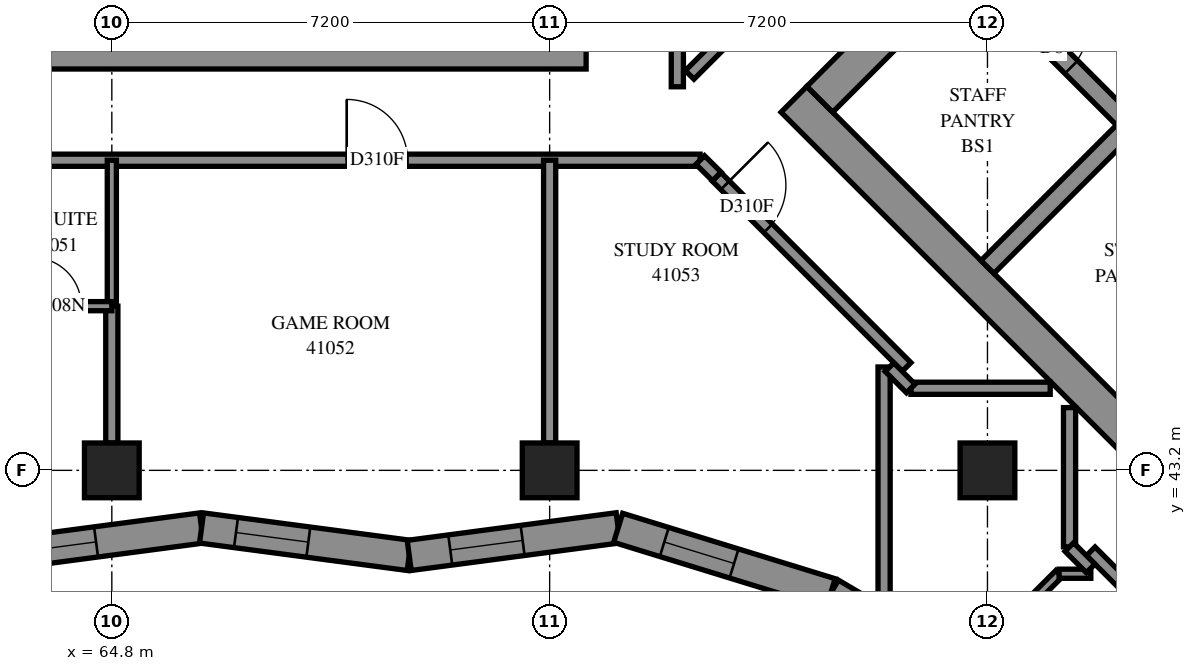
"""IFC4 building model, lengths in metres.
Left out: names, types, materials, properties, quantities, classifications, styles, units other than length and angle.
Written with IfcOpenShell. Run it as: python <this file> out.ifc"""

import sys

from ifc_helpers import new_model, si_unit, direction, frame, frame_2d, origin, origin_2d, place, context, subcontext, project, spatial, polyline, rectangle, outline, extrude, element, fill, save


model = new_model("IFC4")
c1 = context("Model", 3, precision=1e-05, world=origin(), true_north=direction((0.0, 1.0)))
c2 = subcontext(c1, "Body", "Model", "MODEL_VIEW")
j1 = project(units=[si_unit("LENGTHUNIT", "METRE"), si_unit("PLANEANGLEUNIT", "RADIAN")], contexts=[c1])
p1 = place(None, origin())
s1 = spatial("IfcSite", under=j1, at=p1, CompositionType="ELEMENT")
p2 = place(p1, origin())
s2 = spatial("IfcBuilding", under=s1, at=p2, CompositionType="ELEMENT")
p3 = place(p2, frame((0.0, 0.0, 152.4)))
s3 = spatial("IfcBuildingStorey", under=s2, at=p3, CompositionType="ELEMENT", Elevation=152.4)
for number, where, z_axis, x_axis in (
    (1, (64.8, 43.2, 0.0), (0.0, 0.0, 1.0), (1.0, 0.0, 0.0)),
    (2, (72.0, 43.2, 0.0), (0.0, 0.0, 1.0), (1.0, 0.0, 0.0)),
    (3, (79.2, 43.2, 0.0), (0.0, 0.0, 1.0), (1.0, 0.0, 0.0)),
):
    element("IfcColumn", number, at=place(p3, frame(where, z_axis=z_axis, x_axis=x_axis)), inside=s3, PredefinedType="COLUMN", context=c2, shape_type="SweptSolid", body=[
        extrude(rectangle(XDim=0.9, YDim=0.9, at=origin_2d()), origin(), (0.0, 0.0, 1.0), 3.1),
    ])
for number, where, z_axis, x_axis in (
    (4, (57.0, 50.1, -0.3), (0.0, 0.0, 1.0), (1.0, 0.0, 0.0)),
    (5, (76.018, 49.302, -0.3), (0.0, 0.0, 1.0), (0.707, -0.707, 0.0)),
):
    element("IfcWall", number, at=place(p3, frame(where, z_axis=z_axis, x_axis=x_axis)), inside=s3, PredefinedType="SHEAR", context=c2, shape_type="SweptSolid", body=[
        extrude(rectangle(XDim=15.6, YDim=0.6, at=frame_2d((7.8, 0.0))), origin(), (0.0, 0.0, 1.0), 2.7),
    ])
p4 = place(p3, frame((76.442, 49.302, -0.3), z_axis=(0.0, 0.0, 1.0), x_axis=(0.7071067812, 0.7071067812, 0.0)))
e6 = element("IfcWall", 6, at=p4, inside=s3, PredefinedType="SHEAR", context=c2, shape_type="SweptSolid", body=[
    extrude(rectangle(XDim=14.4, YDim=0.6, at=frame_2d((7.2, 0.0))), origin(), (0.0, 0.0, 1.0), 2.7),
])
p5 = place(p4, frame((4.55, 0.0, 0.3)))
e7 = element("IfcOpeningElement", 7, at=p5, cuts=e6, PredefinedType="OPENING", context=c2, shape_type="SweptSolid", body=[
    extrude(rectangle(XDim=1.1, YDim=2.1, at=frame_2d((0.55, 1.05))), frame((0.0, 0.31, 0.0), z_axis=(0.0, -1.0, 0.0), x_axis=(1.0, 0.0, 0.0)), (0.0, 0.0, 1.0), 0.62),
])
p6 = place(p4, frame((11.35, 0.0, 0.3)))
e8 = element("IfcOpeningElement", 8, at=p6, cuts=e6, PredefinedType="OPENING", context=c2, shape_type="SweptSolid", body=[
    extrude(rectangle(XDim=1.1, YDim=2.1, at=frame_2d((0.55, 1.05))), frame((0.0, 0.31, 0.0), z_axis=(0.0, -1.0, 0.0), x_axis=(1.0, 0.0, 0.0)), (0.0, 0.0, 1.0), 0.62),
])
p7 = place(p3, frame((79.2, 46.544, 0.0), z_axis=(0.0, 0.0, 1.0), x_axis=(0.7071219326, 0.7070916295, 0.0)))
e9 = element("IfcWall", 9, at=p7, inside=s3, PredefinedType="SOLIDWALL", context=c2, shape_type="SweptSolid", body=[
    extrude(rectangle(XDim=3.3, YDim=0.3, at=frame_2d((1.65, 0.0))), origin(), (0.0, 0.0, 1.0), 3.1),
])
p8 = place(p3, frame((78.988, 51.423, 0.0), z_axis=(0.0, 0.0, 1.0), x_axis=(0.7071067812, -0.7071067812, 0.0)))
e10 = element("IfcWall", 10, at=p8, inside=s3, PredefinedType="SOLIDWALL", context=c2, shape_type="SweptSolid", body=[
    extrude(rectangle(XDim=14.4, YDim=0.3, at=frame_2d((7.2, 0.0))), origin(), (0.0, 0.0, 1.0), 3.1),
])
p9 = place(p8, frame((1.35, 0.0, 0.0)))
e11 = element("IfcOpeningElement", 11, at=p9, cuts=e10, PredefinedType="OPENING", context=c2, shape_type="SweptSolid", body=[
    extrude(rectangle(XDim=0.9, YDim=2.1, at=frame_2d((0.45, 1.05))), frame((0.0, 0.16, 0.0), z_axis=(0.0, -1.0, 0.0), x_axis=(1.0, 0.0, 0.0)), (0.0, 0.0, 1.0), 0.32),
])
p10 = place(p8, frame((4.95, 0.0, 0.0)))
e12 = element("IfcOpeningElement", 12, at=p10, cuts=e10, PredefinedType="OPENING", context=c2, shape_type="SweptSolid", body=[
    extrude(rectangle(XDim=0.9, YDim=2.1, at=frame_2d((0.45, 1.05))), frame((0.0, 0.16, 0.0), z_axis=(0.0, -1.0, 0.0), x_axis=(1.0, 0.0, 0.0)), (0.0, 0.0, 1.0), 0.32),
])
p11 = place(p8, frame((8.55, 0.0, 0.0)))
e13 = element("IfcOpeningElement", 13, at=p11, cuts=e10, PredefinedType="OPENING", context=c2, shape_type="SweptSolid", body=[
    extrude(rectangle(XDim=0.9, YDim=2.1, at=frame_2d((0.45, 1.05))), frame((0.0, 0.16, 0.0), z_axis=(0.0, -1.0, 0.0), x_axis=(1.0, 0.0, 0.0)), (0.0, 0.0, 1.0), 0.32),
])
p12 = place(p8, frame((12.05, 0.0, 0.0)))
e14 = element("IfcOpeningElement", 14, at=p12, cuts=e10, PredefinedType="OPENING", context=c2, shape_type="SweptSolid", body=[
    extrude(rectangle(XDim=1.1, YDim=2.1, at=frame_2d((0.55, 1.05))), frame((0.0, 0.16, 0.0), z_axis=(0.0, -1.0, 0.0), x_axis=(1.0, 0.0, 0.0)), (0.0, 0.0, 1.0), 0.32),
])
p13 = place(p3, frame((62.86, 41.801, 0.0), z_axis=(0.0, 0.0, 1.0), x_axis=(0.9913924297, 0.1309238341, 0.0)))
e15 = element("IfcWall", 15, at=p13, inside=s3, PredefinedType="SOLIDWALL", context=c2, shape_type="SweptSolid", body=[
    extrude(outline(polyline([(-0.033, -0.25), (3.412, -0.25), (3.478, 0.25), (0.033, 0.25), (-0.033, -0.25)])), origin(), (0.0, 0.0, 1.0), 3.1),
])
p14 = place(p13, frame((0.495, 0.0, 0.45)))
e16 = element("IfcOpeningElement", 16, at=p14, cuts=e15, PredefinedType="OPENING", context=c2, shape_type="SweptSolid", body=[
    extrude(rectangle(XDim=1.2, YDim=2.5, at=frame_2d((0.6, 1.25))), frame((0.0, 0.26, 0.0), z_axis=(0.0, -1.0, 0.0), x_axis=(1.0, 0.0, 0.0)), (0.0, 0.0, 1.0), 0.52),
])
p15 = place(p3, frame((66.275, 42.252, 0.0), z_axis=(0.0, 0.0, 1.0), x_axis=(0.9913919321, -0.1309276022, 0.0)))
e17 = element("IfcWall", 17, at=p15, inside=s3, PredefinedType="SOLIDWALL", context=c2, shape_type="SweptSolid", body=[
    extrude(outline(polyline([(0.033, -0.25), (3.478, -0.25), (3.412, 0.25), (-0.033, 0.25), (0.033, -0.25)])), origin(), (0.0, 0.0, 1.0), 3.1),
])
p16 = place(p15, frame((0.572, 0.0, 0.45)))
e18 = element("IfcOpeningElement", 18, at=p16, cuts=e17, PredefinedType="OPENING", context=c2, shape_type="SweptSolid", body=[
    extrude(rectangle(XDim=1.2, YDim=2.5, at=frame_2d((0.6, 1.25))), frame((0.0, 0.26, 0.0), z_axis=(0.0, -1.0, 0.0), x_axis=(1.0, 0.0, 0.0)), (0.0, 0.0, 1.0), 0.52),
])
p17 = place(p3, frame((69.69, 41.801, 0.0), z_axis=(0.0, 0.0, 1.0), x_axis=(0.9913934068, 0.1309164348, 0.0)))
e19 = element("IfcWall", 19, at=p17, inside=s3, PredefinedType="SOLIDWALL", context=c2, shape_type="SweptSolid", body=[
    extrude(outline(polyline([(-0.033, -0.25), (3.412, -0.25), (3.521, 0.25), (0.033, 0.25), (-0.033, -0.25)])), origin(), (0.0, 0.0, 1.0), 3.1),
])
p18 = place(p17, frame((0.681, 0.0, 0.45)))
e20 = element("IfcOpeningElement", 20, at=p18, cuts=e19, PredefinedType="OPENING", context=c2, shape_type="SweptSolid", body=[
    extrude(rectangle(XDim=1.2, YDim=2.5, at=frame_2d((0.6, 1.25))), frame((0.0, 0.26, 0.0), z_axis=(0.0, -1.0, 0.0), x_axis=(1.0, 0.0, 0.0)), (0.0, 0.0, 1.0), 0.52),
])
p19 = place(p3, frame((73.127, 42.255, 0.0), z_axis=(0.0, 0.0, 1.0), x_axis=(0.9557594957, -0.2941492588, 0.0)))
e21 = element("IfcWall", 21, at=p19, inside=s3, PredefinedType="SOLIDWALL", context=c2, shape_type="SweptSolid", body=[
    extrude(outline(polyline([(0.055, -0.25), (3.628, -0.25), (3.686, 0.25), (-0.055, 0.25), (0.055, -0.25)])), origin(), (0.0, 0.0, 1.0), 3.1),
])
p20 = place(p19, frame((0.794, 0.0, 0.45)))
e22 = element("IfcOpeningElement", 22, at=p20, cuts=e21, PredefinedType="OPENING", context=c2, shape_type="SweptSolid", body=[
    extrude(rectangle(XDim=1.2, YDim=2.5, at=frame_2d((0.6, 1.25))), frame((0.0, 0.26, 0.0), z_axis=(0.0, -1.0, 0.0), x_axis=(1.0, 0.0, 0.0)), (0.0, 0.0, 1.0), 0.52),
])
p21 = place(p3, frame((76.622, 41.179, 0.0), z_axis=(0.0, 0.0, 1.0), x_axis=(0.8618612856, -0.5071440864, 0.0)))
e23 = element("IfcWall", 23, at=p21, inside=s3, PredefinedType="SOLIDWALL", context=c2, shape_type="SweptSolid", body=[
    extrude(outline(polyline([(0.029, -0.25), (4.22, -0.25), (4.312, 0.25), (-0.029, 0.25), (0.029, -0.25)])), origin(), (0.0, 0.0, 1.0), 3.1),
])
p22 = place(p21, frame((0.342, 0.0, 0.45)))
e24 = element("IfcOpeningElement", 24, at=p22, cuts=e23, PredefinedType="OPENING", context=c2, shape_type="SweptSolid", body=[
    extrude(rectangle(XDim=1.2, YDim=2.5, at=frame_2d((0.6, 1.25))), frame((0.0, 0.26, 0.0), z_axis=(0.0, -1.0, 0.0), x_axis=(1.0, 0.0, 0.0)), (0.0, 0.0, 1.0), 0.52),
])
p23 = place(p21, frame((2.674, 0.0, 0.45)))
e25 = element("IfcOpeningElement", 25, at=p23, cuts=e23, PredefinedType="OPENING", context=c2, shape_type="SweptSolid", body=[
    extrude(rectangle(XDim=1.2, YDim=2.5, at=frame_2d((0.6, 1.25))), frame((0.0, 0.26, 0.0), z_axis=(0.0, -1.0, 0.0), x_axis=(1.0, 0.0, 0.0)), (0.0, 0.0, 1.0), 0.52),
])
p24 = place(p3, frame((55.5, 48.3, 0.0), z_axis=(0.0, 0.0, 1.0), x_axis=(1.0, 0.0, 0.0)))
e26 = element("IfcWall", 26, at=p24, inside=s3, PredefinedType="PARTITIONING", context=c2, shape_type="SweptSolid", body=[
    extrude(rectangle(XDim=18.974, YDim=0.2, at=frame_2d((9.487, 0.0))), origin(), (0.0, 0.0, 1.0), 3.1),
])
p25 = place(p24, frame((4.4, 0.0, 0.0)))
e27 = element("IfcOpeningElement", 27, at=p25, cuts=e26, PredefinedType="OPENING", context=c2, shape_type="SweptSolid", body=[
    extrude(rectangle(XDim=0.9, YDim=2.1, at=frame_2d((0.45, 1.05))), frame((0.0, 0.11, 0.0), z_axis=(0.0, -1.0, 0.0), x_axis=(1.0, 0.0, 0.0)), (0.0, 0.0, 1.0), 0.22),
])
p26 = place(p24, frame((6.1, 0.0, 0.0)))
e28 = element("IfcOpeningElement", 28, at=p26, cuts=e26, PredefinedType="OPENING", context=c2, shape_type="SweptSolid", body=[
    extrude(rectangle(XDim=0.9, YDim=2.1, at=frame_2d((0.45, 1.05))), frame((0.0, 0.11, 0.0), z_axis=(0.0, -1.0, 0.0), x_axis=(1.0, 0.0, 0.0)), (0.0, 0.0, 1.0), 0.22),
])
p27 = place(p24, frame((13.162, 0.0, 0.0)))
e29 = element("IfcOpeningElement", 29, at=p27, cuts=e26, PredefinedType="OPENING", context=c2, shape_type="SweptSolid", body=[
    extrude(rectangle(XDim=1.0, YDim=2.1, at=frame_2d((0.5, 1.05))), frame((0.0, 0.11, 0.0), z_axis=(0.0, -1.0, 0.0), x_axis=(1.0, 0.0, 0.0)), (0.0, 0.0, 1.0), 0.22),
])
p28 = place(p3, frame((80.899, 41.869, 0.0), z_axis=(0.0, 0.0, 1.0), x_axis=(0.7071067812, -0.7071067812, 0.0)))
e30 = element("IfcWall", 30, at=p28, inside=s3, PredefinedType="PARTITIONING", context=c2, shape_type="SweptSolid", body=[
    extrude(rectangle(XDim=8.392, YDim=0.2, at=frame_2d((4.196, 0.0))), origin(), (0.0, 0.0, 1.0), 3.1),
])
p29 = place(p28, frame((4.988, 0.0, 0.0)))
e31 = element("IfcOpeningElement", 31, at=p29, cuts=e30, PredefinedType="OPENING", context=c2, shape_type="SweptSolid", body=[
    extrude(rectangle(XDim=0.9, YDim=2.1, at=frame_2d((0.45, 1.05))), frame((0.0, 0.11, 0.0), z_axis=(0.0, -1.0, 0.0), x_axis=(1.0, 0.0, 0.0)), (0.0, 0.0, 1.0), 0.22),
])
p30 = place(p3, frame((72.0, 43.65, 0.0), z_axis=(0.0, 0.0, 1.0), x_axis=(0.0, 1.0, 0.0)))
e32 = element("IfcWall", 32, at=p30, inside=s3, PredefinedType="PARTITIONING", context=c2, shape_type="SweptSolid", body=[
    extrude(rectangle(XDim=4.65, YDim=0.2, at=frame_2d((2.325, 0.0))), origin(), (0.0, 0.0, 1.0), 3.1),
])
p31 = place(p3, frame((74.745, 48.029, 0.0), z_axis=(0.0, 0.0, 1.0), x_axis=(0.7068806156, -0.7073328745, 0.0)))
e33 = element("IfcWall", 33, at=p31, inside=s3, PredefinedType="PARTITIONING", context=c2, shape_type="SweptSolid", body=[
    extrude(rectangle(XDim=4.422, YDim=0.2, at=frame_2d((2.211, 0.0))), origin(), (0.0, 0.0, 1.0), 3.1),
])
p32 = place(p31, frame((0.199, 0.0, 0.0)))
e34 = element("IfcOpeningElement", 34, at=p32, cuts=e33, PredefinedType="OPENING", context=c2, shape_type="SweptSolid", body=[
    extrude(rectangle(XDim=1.0, YDim=2.1, at=frame_2d((0.5, 1.05))), frame((0.0, 0.11, 0.0), z_axis=(0.0, -1.0, 0.0), x_axis=(1.0, 0.0, 0.0)), (0.0, 0.0, 1.0), 0.22),
])
p33 = place(p3, frame((77.5, 40.953, 0.0), z_axis=(0.0, 0.0, 1.0), x_axis=(0.0, 1.0, 0.0)))
e35 = element("IfcWall", 35, at=p33, inside=s3, PredefinedType="PARTITIONING", context=c2, shape_type="SweptSolid", body=[
    extrude(rectangle(XDim=3.947, YDim=0.2, at=frame_2d((1.974, 0.0))), origin(), (0.0, 0.0, 1.0), 3.1),
])
p34 = place(p3, frame((74.302, 49.704, 0.0), z_axis=(0.0, 0.0, 1.0), x_axis=(0.7074614873, 0.706751897, 0.0)))
e36 = element("IfcWall", 36, at=p34, inside=s3, PredefinedType="PARTITIONING", context=c2, shape_type="SweptSolid", body=[
    extrude(rectangle(XDim=2.818, YDim=0.2, at=frame_2d((1.409, 0.0))), origin(), (0.0, 0.0, 1.0), 3.1),
])
p35 = place(p3, frame((64.8, 45.9, 0.0), z_axis=(0.0, 0.0, 1.0), x_axis=(0.0, 1.0, 0.0)))
e37 = element("IfcWall", 37, at=p35, inside=s3, PredefinedType="PARTITIONING", context=c2, shape_type="SweptSolid", body=[
    extrude(rectangle(XDim=2.4, YDim=0.15, at=frame_2d((1.2, 0.0))), origin(), (0.0, 0.0, 1.0), 3.1),
])
for number, where, z_axis, x_axis in (
    (38, (77.942, 44.55, 0.0), (0.0, 0.0, 1.0), (1.0, 0.0, 0.0)),
    (39, (80.55, 41.942, 0.0), (0.0, 0.0, 1.0), (0.0, 1.0, 0.0)),
):
    element("IfcWall", number, at=place(p3, frame(where, z_axis=z_axis, x_axis=x_axis)), inside=s3, PredefinedType="PARTITIONING", context=c2, shape_type="SweptSolid", body=[
        extrude(rectangle(XDim=2.29, YDim=0.2, at=frame_2d((1.145, 0.0))), origin(), (0.0, 0.0, 1.0), 3.1),
    ])
p36 = place(p3, frame((64.8, 43.65, 0.0), z_axis=(0.0, 0.0, 1.0), x_axis=(0.0, 1.0, 0.0)))
e40 = element("IfcWall", 40, at=p36, inside=s3, PredefinedType="PARTITIONING", context=c2, shape_type="SweptSolid", body=[
    extrude(rectangle(XDim=2.25, YDim=0.2, at=frame_2d((1.125, 0.0))), origin(), (0.0, 0.0, 1.0), 3.1),
])
p37 = place(p3, frame((74.1, 49.508, 0.0), z_axis=(0.0, 0.0, 1.0), x_axis=(0.0, 1.0, 0.0)))
e41 = element("IfcWall", 41, at=p37, inside=s3, PredefinedType="PARTITIONING", context=c2, shape_type="SweptSolid", body=[
    extrude(rectangle(XDim=2.192, YDim=0.2, at=frame_2d((1.096, 0.0))), origin(), (0.0, 0.0, 1.0), 3.1),
])
p38 = place(p3, frame((78.967, 40.09, 0.0), z_axis=(0.0, 0.0, 1.0), x_axis=(0.7071067812, 0.7071067812, 0.0)))
e42 = element("IfcWall", 42, at=p38, inside=s3, PredefinedType="PARTITIONING", context=c2, shape_type="SweptSolid", body=[
    extrude(rectangle(XDim=1.995, YDim=0.15, at=frame_2d((0.998, 0.0))), origin(), (0.0, 0.0, 1.0), 3.1),
])
p39 = place(p3, frame((62.9, 45.9, 0.0), z_axis=(0.0, 0.0, 1.0), x_axis=(1.0, 0.0, 0.0)))
e43 = element("IfcWall", 43, at=p39, inside=s3, PredefinedType="PARTITIONING", context=c2, shape_type="SweptSolid", body=[
    extrude(rectangle(XDim=1.9, YDim=0.15, at=frame_2d((0.95, 0.0))), origin(), (0.0, 0.0, 1.0), 3.1),
])
p40 = place(p39, frame((0.598, 0.0, 0.0)))
e44 = element("IfcOpeningElement", 44, at=p40, cuts=e43, PredefinedType="OPENING", context=c2, shape_type="SweptSolid", body=[
    extrude(rectangle(XDim=0.8, YDim=2.1, at=frame_2d((0.4, 1.05))), frame((0.0, 0.085, 0.0), z_axis=(0.0, -1.0, 0.0), x_axis=(1.0, 0.0, 0.0)), (0.0, 0.0, 1.0), 0.17),
])
p41 = place(p3, frame((80.378, 41.5, 0.0), z_axis=(0.0, 0.0, 1.0), x_axis=(1.0, 0.0, 0.0)))
e45 = element("IfcWall", 45, at=p41, inside=s3, PredefinedType="PARTITIONING", context=c2, shape_type="SweptSolid", body=[
    extrude(rectangle(XDim=0.522, YDim=0.15, at=frame_2d((0.261, 0.0))), origin(), (0.0, 0.0, 1.0), 3.1),
])
for number, where, z_axis, x_axis in (
    (46, (77.588, 44.897, 0.0), (0.0, 0.0, 1.0), (0.707, -0.707, 0.0)),
    (47, (80.546, 41.938, 0.0), (0.0, 0.0, 1.0), (0.707, -0.707, 0.0)),
):
    element("IfcWall", number, at=place(p3, frame(where, z_axis=z_axis, x_axis=x_axis)), inside=s3, PredefinedType="PARTITIONING", context=c2, shape_type="SweptSolid", body=[
        extrude(rectangle(XDim=0.495, YDim=0.2, at=frame_2d((0.247, 0.0))), origin(), (0.0, 0.0, 1.0), 3.1),
    ])
p42 = place(p3, frame((74.477, 48.303, 0.0), z_axis=(0.0, 0.0, 1.0), x_axis=(0.7097111995, -0.7044927348, 0.0)))
e48 = element("IfcWall", 48, at=p42, inside=s3, PredefinedType="PARTITIONING", context=c2, shape_type="SweptSolid", body=[
    extrude(rectangle(XDim=0.383, YDim=0.2, at=frame_2d((0.192, 0.0))), origin(), (0.0, 0.0, 1.0), 3.1),
])
p43 = place(p14, origin())
e49 = element("IfcWindow", 49, at=p43, inside=s3, PartitioningType="SINGLE_PANEL", PredefinedType="WINDOW", context=c2, shape_type="SweptSolid", body=[
    extrude(rectangle(XDim=1.2, YDim=2.5, at=frame_2d((0.6, 1.25))), frame((0.0, 0.18, 0.0), z_axis=(0.0, -1.0, 0.0), x_axis=(1.0, 0.0, 0.0)), (0.0, 0.0, 1.0), 0.06),
])
fill(e16, e49)
p44 = place(p16, origin())
e50 = element("IfcWindow", 50, at=p44, inside=s3, PartitioningType="SINGLE_PANEL", PredefinedType="WINDOW", context=c2, shape_type="SweptSolid", body=[
    extrude(rectangle(XDim=1.2, YDim=2.5, at=frame_2d((0.6, 1.25))), frame((0.0, 0.18, 0.0), z_axis=(0.0, -1.0, 0.0), x_axis=(1.0, 0.0, 0.0)), (0.0, 0.0, 1.0), 0.06),
])
fill(e18, e50)
p45 = place(p18, origin())
e51 = element("IfcWindow", 51, at=p45, inside=s3, PartitioningType="SINGLE_PANEL", PredefinedType="WINDOW", context=c2, shape_type="SweptSolid", body=[
    extrude(rectangle(XDim=1.2, YDim=2.5, at=frame_2d((0.6, 1.25))), frame((0.0, 0.18, 0.0), z_axis=(0.0, -1.0, 0.0), x_axis=(1.0, 0.0, 0.0)), (0.0, 0.0, 1.0), 0.06),
])
fill(e20, e51)
p46 = place(p20, origin())
e52 = element("IfcWindow", 52, at=p46, inside=s3, PartitioningType="SINGLE_PANEL", PredefinedType="WINDOW", context=c2, shape_type="SweptSolid", body=[
    extrude(rectangle(XDim=1.2, YDim=2.5, at=frame_2d((0.6, 1.25))), frame((0.0, 0.18, 0.0), z_axis=(0.0, -1.0, 0.0), x_axis=(1.0, 0.0, 0.0)), (0.0, 0.0, 1.0), 0.06),
])
fill(e22, e52)
p47 = place(p9, origin())
e53 = element("IfcDoor", 53, at=p47, inside=s3, OperationType="SINGLE_SWING_LEFT", PredefinedType="DOOR", context=c2, shape_type="SweptSolid", body=[
    extrude(rectangle(XDim=0.9, YDim=2.1, at=frame_2d((0.45, 1.05))), frame((0.0, 0.025, 0.0), z_axis=(0.0, -1.0, 0.0), x_axis=(1.0, 0.0, 0.0)), (0.0, 0.0, 1.0), 0.05),
])
fill(e11, e53)
p48 = place(p40, origin())
e54 = element("IfcDoor", 54, at=p48, inside=s3, OperationType="SINGLE_SWING_RIGHT", PredefinedType="DOOR", context=c2, shape_type="SweptSolid", body=[
    extrude(rectangle(XDim=0.8, YDim=2.1, at=frame_2d((0.4, 1.05))), frame((0.0, 0.025, 0.0), z_axis=(0.0, -1.0, 0.0), x_axis=(1.0, 0.0, 0.0)), (0.0, 0.0, 1.0), 0.05),
])
fill(e44, e54)
p49 = place(p27, origin())
e55 = element("IfcDoor", 55, at=p49, inside=s3, OperationType="SINGLE_SWING_LEFT", PredefinedType="DOOR", context=c2, shape_type="SweptSolid", body=[
    extrude(rectangle(XDim=1.0, YDim=2.1, at=frame_2d((0.5, 1.05))), frame((0.0, 0.025, 0.0), z_axis=(0.0, -1.0, 0.0), x_axis=(1.0, 0.0, 0.0)), (0.0, 0.0, 1.0), 0.05),
])
fill(e29, e55)
p50 = place(p32, origin())
e56 = element("IfcDoor", 56, at=p50, inside=s3, OperationType="SINGLE_SWING_LEFT", PredefinedType="DOOR", context=c2, shape_type="SweptSolid", body=[
    extrude(rectangle(XDim=1.0, YDim=2.1, at=frame_2d((0.5, 1.05))), frame((0.0, 0.025, 0.0), z_axis=(0.0, -1.0, 0.0), x_axis=(1.0, 0.0, 0.0)), (0.0, 0.0, 1.0), 0.05),
])
fill(e34, e56)
save(model, sys.argv[1])
